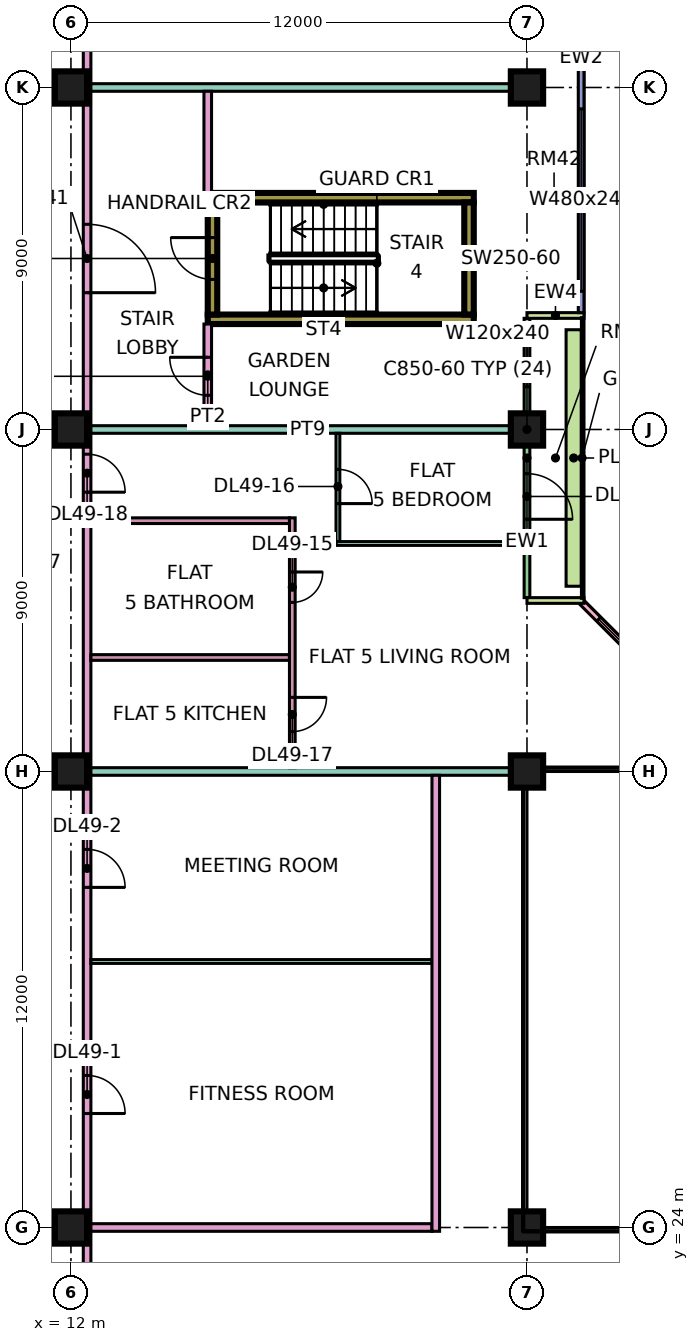
"""IFC4 building model, lengths in metres.
Left out: names, types, materials, properties, quantities, classifications, styles, units other than length and angle.
Written with IfcOpenShell. Run it as: python <this file> out.ifc"""

import sys

from ifc_helpers import new_model, si_unit, direction, frame, frame_2d, origin, origin_2d, place, context, subcontext, project, spatial, rectangle, extrude, element, fill, save


model = new_model("IFC4")
c1 = context("Model", 3, precision=1e-05, world=origin(), true_north=direction((0.0, 1.0)))
c2 = subcontext(c1, "Body", "Model", "MODEL_VIEW")
j1 = project(units=[si_unit("LENGTHUNIT", "METRE"), si_unit("PLANEANGLEUNIT", "RADIAN")], contexts=[c1])
p1 = place(None, origin())
s1 = spatial("IfcSite", under=j1, at=p1, CompositionType="ELEMENT")
p2 = place(p1, origin())
s2 = spatial("IfcBuilding", under=s1, at=p2, CompositionType="ELEMENT")
p3 = place(p2, frame((0.0, 0.0, 211.65)))
s3 = spatial("IfcBuildingStorey", under=s2, at=p3, CompositionType="ELEMENT", Elevation=211.65)
for number, where, z_axis, x_axis in (
    (1, (12.0, 24.0, 0.0), (0.0, 0.0, 1.0), (1.0, 0.0, 0.0)),
    (2, (12.0, 36.0, 0.0), (0.0, 0.0, 1.0), (1.0, 0.0, 0.0)),
    (3, (12.0, 45.0, 0.0), (0.0, 0.0, 1.0), (1.0, 0.0, 0.0)),
    (4, (12.0, 54.0, 0.0), (0.0, 0.0, 1.0), (1.0, 0.0, 0.0)),
    (5, (24.0, 24.0, 0.0), (0.0, 0.0, 1.0), (1.0, 0.0, 0.0)),
    (6, (24.0, 36.0, 0.0), (0.0, 0.0, 1.0), (1.0, 0.0, 0.0)),
    (7, (24.0, 45.0, 0.0), (0.0, 0.0, 1.0), (1.0, 0.0, 0.0)),
    (8, (24.0, 54.0, 0.0), (0.0, 0.0, 1.0), (1.0, 0.0, 0.0)),
):
    element("IfcColumn", number, at=place(p3, frame(where, z_axis=z_axis, x_axis=x_axis)), inside=s3, PredefinedType="COLUMN", context=c2, shape_type="SweptSolid", body=[
        extrude(rectangle(XDim=0.85, YDim=0.85, at=origin_2d()), origin(), (0.0, 0.0, 1.0), 3.75),
    ])
for number, where, z_axis, x_axis in (
    (9, (15.6, 47.9, 0.0), (0.0, 0.0, 1.0), (1.0, 0.0, 0.0)),
    (10, (15.6, 51.1, 0.0), (0.0, 0.0, 1.0), (1.0, 0.0, 0.0)),
):
    element("IfcWall", number, at=place(p3, frame(where, z_axis=z_axis, x_axis=x_axis)), inside=s3, PredefinedType="SHEAR", context=c2, shape_type="SweptSolid", body=[
        extrude(rectangle(XDim=7.0, YDim=0.25, at=frame_2d((3.5, 0.0))), origin(), (0.0, 0.0, 1.0), 3.75),
    ])
p4 = place(p3, frame((15.725, 48.025, 0.0), z_axis=(0.0, 0.0, 1.0), x_axis=(0.0, 1.0, 0.0)))
e11 = element("IfcWall", 11, at=p4, inside=s3, PredefinedType="SHEAR", context=c2, shape_type="SweptSolid", body=[
    extrude(rectangle(XDim=2.95, YDim=0.25, at=frame_2d((1.475, 0.0))), origin(), (0.0, 0.0, 1.0), 3.75),
])
p5 = place(p4, frame((0.925, 0.0, 0.0)))
e12 = element("IfcOpeningElement", 12, at=p5, cuts=e11, PredefinedType="OPENING", context=c2, shape_type="SweptSolid", body=[
    extrude(rectangle(XDim=1.1, YDim=2.2, at=frame_2d((0.55, 1.1))), frame((0.0, 0.135, 0.0), z_axis=(0.0, -1.0, 0.0), x_axis=(1.0, 0.0, 0.0)), (0.0, 0.0, 1.0), 0.27),
])
p6 = place(p3, frame((22.475, 48.025, 0.0), z_axis=(0.0, 0.0, 1.0), x_axis=(0.0, 1.0, 0.0)))
e13 = element("IfcWall", 13, at=p6, inside=s3, PredefinedType="SHEAR", context=c2, shape_type="SweptSolid", body=[
    extrude(rectangle(XDim=2.95, YDim=0.25, at=frame_2d((1.475, 0.0))), origin(), (0.0, 0.0, 1.0), 3.75),
])
p7 = place(p3, frame((28.447, 37.447, 0.0), z_axis=(0.0, 0.0, 1.0), x_axis=(-0.707106781187, 0.707106781187, 0.0)))
e14 = element("IfcWall", 14, at=p7, inside=s3, PredefinedType="SOLIDWALL", context=c2, shape_type="SweptSolid", body=[
    extrude(rectangle(XDim=4.243, YDim=0.15, at=frame_2d((2.121, 0.0))), origin(), (0.0, 0.0, 1.0), 3.35),
])
p8 = place(p7, frame((0.621, 0.0, 0.45)))
e15 = element("IfcOpeningElement", 15, at=p8, cuts=e14, PredefinedType="OPENING", context=c2, shape_type="SweptSolid", body=[
    extrude(rectangle(XDim=3.0, YDim=2.4, at=frame_2d((1.5, 1.2))), frame((0.0, 0.085, 0.0), z_axis=(0.0, -1.0, 0.0), x_axis=(1.0, 0.0, 0.0)), (0.0, 0.0, 1.0), 0.17),
])
p9 = place(p3, frame((24.0, 40.575, 0.0), z_axis=(0.0, 0.0, 1.0), x_axis=(0.0, 1.0, 0.0)))
e16 = element("IfcWall", 16, at=p9, inside=s3, PredefinedType="SOLIDWALL", context=c2, shape_type="SweptSolid", body=[
    extrude(rectangle(XDim=7.35, YDim=0.15, at=frame_2d((3.675, 0.0))), origin(), (0.0, 0.0, 1.0), 3.35),
])
p10 = place(p9, frame((2.062, 0.0, 0.0)))
e17 = element("IfcOpeningElement", 17, at=p10, cuts=e16, PredefinedType="OPENING", context=c2, shape_type="SweptSolid", body=[
    extrude(rectangle(XDim=1.2, YDim=2.4, at=frame_2d((0.6, 1.2))), frame((0.0, 0.085, 0.0), z_axis=(0.0, -1.0, 0.0), x_axis=(1.0, 0.0, 0.0)), (0.0, 0.0, 1.0), 0.17),
])
p11 = place(p9, frame((5.55, 0.0, 0.45)))
e18 = element("IfcOpeningElement", 18, at=p11, cuts=e16, PredefinedType="OPENING", context=c2, shape_type="SweptSolid", body=[
    extrude(rectangle(XDim=1.2, YDim=2.4, at=frame_2d((0.6, 1.2))), frame((0.0, 0.085, 0.0), z_axis=(0.0, -1.0, 0.0), x_axis=(1.0, 0.0, 0.0)), (0.0, 0.0, 1.0), 0.17),
])
for number, where, z_axis, x_axis in (
    (19, (25.5, 40.5, 0.0), (0.0, 0.0, 1.0), (-1.0, 0.0, 0.0)),
    (20, (25.5, 48.0, 0.0), (0.0, 0.0, 1.0), (-1.0, 0.0, 0.0)),
):
    element("IfcWall", number, at=place(p3, frame(where, z_axis=z_axis, x_axis=x_axis)), inside=s3, PredefinedType="SOLIDWALL", context=c2, shape_type="SweptSolid", body=[
        extrude(rectangle(XDim=1.5, YDim=0.15, at=frame_2d((0.75, 0.0))), origin(), (0.0, 0.0, 1.0), 3.35),
    ])
p12 = place(p3, frame((25.425, 48.075, 0.0), z_axis=(0.0, 0.0, 1.0), x_axis=(0.0, 1.0, 0.0)))
e21 = element("IfcWall", 21, at=p12, inside=s3, PredefinedType="SOLIDWALL", context=c2, shape_type="SweptSolid", body=[
    extrude(rectangle(XDim=13.425, YDim=0.15, at=frame_2d((6.712, 0.0))), origin(), (0.0, 0.0, 1.0), 3.35),
])
p13 = place(p12, frame((0.562, 0.0, 0.45)))
e22 = element("IfcOpeningElement", 22, at=p13, cuts=e21, PredefinedType="OPENING", context=c2, shape_type="SweptSolid", body=[
    extrude(rectangle(XDim=4.8, YDim=2.4, at=frame_2d((2.4, 1.2))), frame((0.0, 0.085, 0.0), z_axis=(0.0, -1.0, 0.0), x_axis=(1.0, 0.0, 0.0)), (0.0, 0.0, 1.0), 0.17),
])
p14 = place(p12, frame((7.425, 0.0, 0.45)))
e23 = element("IfcOpeningElement", 23, at=p14, cuts=e21, PredefinedType="OPENING", context=c2, shape_type="SweptSolid", body=[
    extrude(rectangle(XDim=3.0, YDim=2.4, at=frame_2d((1.5, 1.2))), frame((0.0, 0.085, 0.0), z_axis=(0.0, -1.0, 0.0), x_axis=(1.0, 0.0, 0.0)), (0.0, 0.0, 1.0), 0.17),
])
p15 = place(p12, frame((12.225, 0.0, 0.45)))
e24 = element("IfcOpeningElement", 24, at=p15, cuts=e21, PredefinedType="OPENING", context=c2, shape_type="SweptSolid", body=[
    extrude(rectangle(XDim=0.9, YDim=2.4, at=frame_2d((0.45, 1.2))), frame((0.0, 0.085, 0.0), z_axis=(0.0, -1.0, 0.0), x_axis=(1.0, 0.0, 0.0)), (0.0, 0.0, 1.0), 0.17),
])
p16 = place(p3, frame((25.229, 40.875, 0.0), z_axis=(0.0, 0.0, 1.0), x_axis=(0.0, 1.0, 0.0)))
e25 = element("IfcWall", 25, at=p16, inside=s3, PredefinedType="SOLIDWALL", context=c2, shape_type="SweptSolid", body=[
    extrude(rectangle(XDim=6.75, YDim=0.4, at=frame_2d((3.375, 0.0))), origin(), (0.0, 0.0, 1.0), 0.7),
])
p17 = place(p3, frame((12.425, 20.0, 0.0), z_axis=(0.0, 0.0, 1.0), x_axis=(0.0, 1.0, 0.0)))
e26 = element("IfcWall", 26, at=p17, inside=s3, PredefinedType="PARTITIONING", context=c2, shape_type="SweptSolid", body=[
    extrude(rectangle(XDim=42.926, YDim=0.2, at=frame_2d((21.463, 0.0))), origin(), (0.0, 0.0, 1.0), 3.35),
])
p18 = place(p17, frame((7.0, 0.0, 0.0)))
e27 = element("IfcOpeningElement", 27, at=p18, cuts=e26, PredefinedType="OPENING", context=c2, shape_type="SweptSolid", body=[
    extrude(rectangle(XDim=1.0, YDim=2.1, at=frame_2d((0.5, 1.05))), frame((0.0, 0.11, 0.0), z_axis=(0.0, -1.0, 0.0), x_axis=(1.0, 0.0, 0.0)), (0.0, 0.0, 1.0), 0.22),
])
p19 = place(p17, frame((12.95, 0.0, 0.0)))
e28 = element("IfcOpeningElement", 28, at=p19, cuts=e26, PredefinedType="OPENING", context=c2, shape_type="SweptSolid", body=[
    extrude(rectangle(XDim=1.0, YDim=2.1, at=frame_2d((0.5, 1.05))), frame((0.0, 0.11, 0.0), z_axis=(0.0, -1.0, 0.0), x_axis=(1.0, 0.0, 0.0)), (0.0, 0.0, 1.0), 0.22),
])
p20 = place(p17, frame((23.35, 0.0, 0.0)))
e29 = element("IfcOpeningElement", 29, at=p20, cuts=e26, PredefinedType="OPENING", context=c2, shape_type="SweptSolid", body=[
    extrude(rectangle(XDim=1.0, YDim=2.1, at=frame_2d((0.5, 1.05))), frame((0.0, 0.11, 0.0), z_axis=(0.0, -1.0, 0.0), x_axis=(1.0, 0.0, 0.0)), (0.0, 0.0, 1.0), 0.22),
])
p21 = place(p17, frame((35.2, 0.0, 0.0)))
e30 = element("IfcOpeningElement", 30, at=p21, cuts=e26, PredefinedType="OPENING", context=c2, shape_type="SweptSolid", body=[
    extrude(rectangle(XDim=1.0, YDim=2.1, at=frame_2d((0.5, 1.05))), frame((0.0, 0.11, 0.0), z_axis=(0.0, -1.0, 0.0), x_axis=(1.0, 0.0, 0.0)), (0.0, 0.0, 1.0), 0.22),
])
p22 = place(p17, frame((1.15, 0.0, 0.0)))
e31 = element("IfcOpeningElement", 31, at=p22, cuts=e26, PredefinedType="OPENING", context=c2, shape_type="SweptSolid", body=[
    extrude(rectangle(XDim=1.8, YDim=2.1, at=frame_2d((0.9, 1.05))), frame((0.0, 0.11, 0.0), z_axis=(0.0, -1.0, 0.0), x_axis=(1.0, 0.0, 0.0)), (0.0, 0.0, 1.0), 0.22),
])
p23 = place(p17, frame((28.6, 0.0, 0.0)))
e32 = element("IfcOpeningElement", 32, at=p23, cuts=e26, PredefinedType="OPENING", context=c2, shape_type="SweptSolid", body=[
    extrude(rectangle(XDim=1.8, YDim=2.1, at=frame_2d((0.9, 1.05))), frame((0.0, 0.11, 0.0), z_axis=(0.0, -1.0, 0.0), x_axis=(1.0, 0.0, 0.0)), (0.0, 0.0, 1.0), 0.22),
])
p24 = place(p3, frame((12.525, 24.0, 0.0), z_axis=(0.0, 0.0, 1.0), x_axis=(1.0, 0.0, 0.0)))
e33 = element("IfcWall", 33, at=p24, inside=s3, PredefinedType="PARTITIONING", context=c2, shape_type="SweptSolid", body=[
    extrude(rectangle(XDim=8.975, YDim=0.2, at=frame_2d((4.488, 0.0))), origin(), (0.0, 0.0, 1.0), 3.35),
])
p25 = place(p3, frame((12.525, 31.0, 0.0), z_axis=(0.0, 0.0, 1.0), x_axis=(1.0, 0.0, 0.0)))
e34 = element("IfcWall", 34, at=p25, inside=s3, PredefinedType="PARTITIONING", context=c2, shape_type="SweptSolid", body=[
    extrude(rectangle(XDim=8.975, YDim=0.1, at=frame_2d((4.488, 0.0))), origin(), (0.0, 0.0, 1.0), 3.35),
])
p26 = place(p3, frame((12.525, 36.0, 0.0), z_axis=(0.0, 0.0, 1.0), x_axis=(1.0, 0.0, 0.0)))
e35 = element("IfcWall", 35, at=p26, inside=s3, PredefinedType="PARTITIONING", context=c2, shape_type="SweptSolid", body=[
    extrude(rectangle(XDim=11.475, YDim=0.2, at=frame_2d((5.738, 0.0))), origin(), (0.0, 0.0, 1.0), 3.35),
])
for number, where, z_axis, x_axis in (
    (36, (12.525, 39.0, 0.0), (0.0, 0.0, 1.0), (1.0, 0.0, 0.0)),
    (37, (12.525, 42.6, 0.0), (0.0, 0.0, 1.0), (1.0, 0.0, 0.0)),
):
    element("IfcWall", number, at=place(p3, frame(where, z_axis=z_axis, x_axis=x_axis)), inside=s3, PredefinedType="PARTITIONING", context=c2, shape_type="SweptSolid", body=[
        extrude(rectangle(XDim=5.225, YDim=0.15, at=frame_2d((2.613, 0.0))), origin(), (0.0, 0.0, 1.0), 3.35),
    ])
p27 = place(p3, frame((12.525, 45.0, 0.0), z_axis=(0.0, 0.0, 1.0), x_axis=(1.0, 0.0, 0.0)))
e38 = element("IfcWall", 38, at=p27, inside=s3, PredefinedType="PARTITIONING", context=c2, shape_type="SweptSolid", body=[
    extrude(rectangle(XDim=11.401, YDim=0.2, at=frame_2d((5.701, 0.0))), origin(), (0.0, 0.0, 1.0), 3.35),
])
p28 = place(p3, frame((12.525, 54.0, 0.0), z_axis=(0.0, 0.0, 1.0), x_axis=(1.0, 0.0, 0.0)))
e39 = element("IfcWall", 39, at=p28, inside=s3, PredefinedType="PARTITIONING", context=c2, shape_type="SweptSolid", body=[
    extrude(rectangle(XDim=11.475, YDim=0.2, at=frame_2d((5.738, 0.0))), origin(), (0.0, 0.0, 1.0), 3.35),
])
p29 = place(p3, frame((15.6, 45.1, 0.0), z_axis=(0.0, 0.0, 1.0), x_axis=(0.0, 1.0, 0.0)))
e40 = element("IfcWall", 40, at=p29, inside=s3, PredefinedType="PARTITIONING", context=c2, shape_type="SweptSolid", body=[
    extrude(rectangle(XDim=2.675, YDim=0.2, at=frame_2d((1.337, 0.0))), origin(), (0.0, 0.0, 1.0), 3.35),
])
p30 = place(p29, frame((0.8, 0.0, 0.0)))
e41 = element("IfcOpeningElement", 41, at=p30, cuts=e40, PredefinedType="OPENING", context=c2, shape_type="SweptSolid", body=[
    extrude(rectangle(XDim=1.0, YDim=2.1, at=frame_2d((0.5, 1.05))), frame((0.0, 0.11, 0.0), z_axis=(0.0, -1.0, 0.0), x_axis=(1.0, 0.0, 0.0)), (0.0, 0.0, 1.0), 0.22),
])
p31 = place(p3, frame((15.6, 51.225, 0.0), z_axis=(0.0, 0.0, 1.0), x_axis=(0.0, 1.0, 0.0)))
e42 = element("IfcWall", 42, at=p31, inside=s3, PredefinedType="PARTITIONING", context=c2, shape_type="SweptSolid", body=[
    extrude(rectangle(XDim=2.675, YDim=0.2, at=frame_2d((1.337, 0.0))), origin(), (0.0, 0.0, 1.0), 3.35),
])
p32 = place(p3, frame((17.825, 36.1, 0.0), z_axis=(0.0, 0.0, 1.0), x_axis=(0.0, 1.0, 0.0)))
e43 = element("IfcWall", 43, at=p32, inside=s3, PredefinedType="PARTITIONING", context=c2, shape_type="SweptSolid", body=[
    extrude(rectangle(XDim=6.575, YDim=0.15, at=frame_2d((3.288, 0.0))), origin(), (0.0, 0.0, 1.0), 3.35),
])
p33 = place(p32, frame((4.35, 0.0, 0.0)))
e44 = element("IfcOpeningElement", 44, at=p33, cuts=e43, PredefinedType="OPENING", context=c2, shape_type="SweptSolid", body=[
    extrude(rectangle(XDim=0.8, YDim=2.1, at=frame_2d((0.4, 1.05))), frame((0.0, 0.085, 0.0), z_axis=(0.0, -1.0, 0.0), x_axis=(1.0, 0.0, 0.0)), (0.0, 0.0, 1.0), 0.17),
])
p34 = place(p32, frame((0.95, 0.0, 0.0)))
e45 = element("IfcOpeningElement", 45, at=p34, cuts=e43, PredefinedType="OPENING", context=c2, shape_type="SweptSolid", body=[
    extrude(rectangle(XDim=0.9, YDim=2.1, at=frame_2d((0.45, 1.05))), frame((0.0, 0.085, 0.0), z_axis=(0.0, -1.0, 0.0), x_axis=(1.0, 0.0, 0.0)), (0.0, 0.0, 1.0), 0.17),
])
p35 = place(p3, frame((18.975, 42.0, 0.0), z_axis=(0.0, 0.0, 1.0), x_axis=(1.0, 0.0, 0.0)))
e46 = element("IfcWall", 46, at=p35, inside=s3, PredefinedType="PARTITIONING", context=c2, shape_type="SweptSolid", body=[
    extrude(rectangle(XDim=4.951, YDim=0.1, at=frame_2d((2.476, 0.0))), origin(), (0.0, 0.0, 1.0), 3.35),
])
p36 = place(p3, frame((19.025, 42.05, 0.0), z_axis=(0.0, 0.0, 1.0), x_axis=(0.0, 1.0, 0.0)))
e47 = element("IfcWall", 47, at=p36, inside=s3, PredefinedType="PARTITIONING", context=c2, shape_type="SweptSolid", body=[
    extrude(rectangle(XDim=2.85, YDim=0.1, at=frame_2d((1.425, 0.0))), origin(), (0.0, 0.0, 1.0), 3.35),
])
p37 = place(p36, frame((1.0, 0.0, 0.0)))
e48 = element("IfcOpeningElement", 48, at=p37, cuts=e47, PredefinedType="OPENING", context=c2, shape_type="SweptSolid", body=[
    extrude(rectangle(XDim=0.9, YDim=2.1, at=frame_2d((0.45, 1.05))), frame((0.0, 0.06, 0.0), z_axis=(0.0, -1.0, 0.0), x_axis=(1.0, 0.0, 0.0)), (0.0, 0.0, 1.0), 0.12),
])
p38 = place(p3, frame((21.6, 23.9, 0.0), z_axis=(0.0, 0.0, 1.0), x_axis=(0.0, 1.0, 0.0)))
e49 = element("IfcWall", 49, at=p38, inside=s3, PredefinedType="PARTITIONING", context=c2, shape_type="SweptSolid", body=[
    extrude(rectangle(XDim=12.0, YDim=0.2, at=frame_2d((6.0, 0.0))), origin(), (0.0, 0.0, 1.0), 3.35),
])
p39 = place(p8, origin())
e50 = element("IfcWindow", 50, at=p39, inside=s3, PartitioningType="SINGLE_PANEL", PredefinedType="WINDOW", context=c2, shape_type="SweptSolid", body=[
    extrude(rectangle(XDim=3.0, YDim=2.4, at=frame_2d((1.5, 1.2))), frame((0.0, 0.03, 0.0), z_axis=(0.0, -1.0, 0.0), x_axis=(1.0, 0.0, 0.0)), (0.0, 0.0, 1.0), 0.06),
])
fill(e15, e50)
p40 = place(p10, frame((1.2, 0.0, 0.0), z_axis=(0.0, 0.0, 1.0), x_axis=(-1.0, 0.0, 0.0)))
e51 = element("IfcDoor", 51, at=p40, inside=s3, OperationType="DOUBLE_DOOR_SINGLE_SWING", PredefinedType="DOOR", context=c2, shape_type="SweptSolid", body=[
    extrude(rectangle(XDim=1.2, YDim=2.4, at=frame_2d((0.6, 1.2))), frame((0.0, 0.025, 0.0), z_axis=(0.0, -1.0, 0.0), x_axis=(1.0, 0.0, 0.0)), (0.0, 0.0, 1.0), 0.05),
])
fill(e17, e51)
p41 = place(p11, origin())
e52 = element("IfcWindow", 52, at=p41, inside=s3, PartitioningType="SINGLE_PANEL", PredefinedType="WINDOW", context=c2, shape_type="SweptSolid", body=[
    extrude(rectangle(XDim=1.2, YDim=2.4, at=frame_2d((0.6, 1.2))), frame((0.0, 0.03, 0.0), z_axis=(0.0, -1.0, 0.0), x_axis=(1.0, 0.0, 0.0)), (0.0, 0.0, 1.0), 0.06),
])
fill(e18, e52)
p42 = place(p13, origin())
e53 = element("IfcWindow", 53, at=p42, inside=s3, PartitioningType="SINGLE_PANEL", PredefinedType="WINDOW", context=c2, shape_type="SweptSolid", body=[
    extrude(rectangle(XDim=4.8, YDim=2.4, at=frame_2d((2.4, 1.2))), frame((0.0, 0.03, 0.0), z_axis=(0.0, -1.0, 0.0), x_axis=(1.0, 0.0, 0.0)), (0.0, 0.0, 1.0), 0.06),
])
fill(e22, e53)
p43 = place(p5, frame((1.1, 0.0, 0.0), z_axis=(0.0, 0.0, 1.0), x_axis=(-1.0, 0.0, 0.0)))
e54 = element("IfcDoor", 54, at=p43, inside=s3, OperationType="SINGLE_SWING_RIGHT", PredefinedType="DOOR", context=c2, shape_type="SweptSolid", body=[
    extrude(rectangle(XDim=1.1, YDim=2.2, at=frame_2d((0.55, 1.1))), frame((0.0, 0.025, 0.0), z_axis=(0.0, -1.0, 0.0), x_axis=(1.0, 0.0, 0.0)), (0.0, 0.0, 1.0), 0.05),
])
fill(e12, e54)
p44 = place(p18, frame((1.0, 0.0, 0.0), z_axis=(0.0, 0.0, 1.0), x_axis=(-1.0, 0.0, 0.0)))
e55 = element("IfcDoor", 55, at=p44, inside=s3, OperationType="SINGLE_SWING_LEFT", PredefinedType="DOOR", context=c2, shape_type="SweptSolid", body=[
    extrude(rectangle(XDim=1.0, YDim=2.1, at=frame_2d((0.5, 1.05))), frame((0.0, 0.025, 0.0), z_axis=(0.0, -1.0, 0.0), x_axis=(1.0, 0.0, 0.0)), (0.0, 0.0, 1.0), 0.05),
])
fill(e27, e55)
p45 = place(p19, frame((1.0, 0.0, 0.0), z_axis=(0.0, 0.0, 1.0), x_axis=(-1.0, 0.0, 0.0)))
e56 = element("IfcDoor", 56, at=p45, inside=s3, OperationType="SINGLE_SWING_LEFT", PredefinedType="DOOR", context=c2, shape_type="SweptSolid", body=[
    extrude(rectangle(XDim=1.0, YDim=2.1, at=frame_2d((0.5, 1.05))), frame((0.0, 0.025, 0.0), z_axis=(0.0, -1.0, 0.0), x_axis=(1.0, 0.0, 0.0)), (0.0, 0.0, 1.0), 0.05),
])
fill(e28, e56)
p46 = place(p33, origin())
e57 = element("IfcDoor", 57, at=p46, inside=s3, OperationType="SINGLE_SWING_RIGHT", PredefinedType="DOOR", context=c2, shape_type="SweptSolid", body=[
    extrude(rectangle(XDim=0.8, YDim=2.1, at=frame_2d((0.4, 1.05))), frame((0.0, 0.025, 0.0), z_axis=(0.0, -1.0, 0.0), x_axis=(1.0, 0.0, 0.0)), (0.0, 0.0, 1.0), 0.05),
])
fill(e44, e57)
p47 = place(p37, frame((0.9, 0.0, 0.0), z_axis=(0.0, 0.0, 1.0), x_axis=(-1.0, 0.0, 0.0)))
e58 = element("IfcDoor", 58, at=p47, inside=s3, OperationType="SINGLE_SWING_LEFT", PredefinedType="DOOR", context=c2, shape_type="SweptSolid", body=[
    extrude(rectangle(XDim=0.9, YDim=2.1, at=frame_2d((0.45, 1.05))), frame((0.0, 0.025, 0.0), z_axis=(0.0, -1.0, 0.0), x_axis=(1.0, 0.0, 0.0)), (0.0, 0.0, 1.0), 0.05),
])
fill(e48, e58)
p48 = place(p34, origin())
e59 = element("IfcDoor", 59, at=p48, inside=s3, OperationType="SINGLE_SWING_RIGHT", PredefinedType="DOOR", context=c2, shape_type="SweptSolid", body=[
    extrude(rectangle(XDim=0.9, YDim=2.1, at=frame_2d((0.45, 1.05))), frame((0.0, 0.025, 0.0), z_axis=(0.0, -1.0, 0.0), x_axis=(1.0, 0.0, 0.0)), (0.0, 0.0, 1.0), 0.05),
])
fill(e45, e59)
p49 = place(p20, frame((1.0, 0.0, 0.0), z_axis=(0.0, 0.0, 1.0), x_axis=(-1.0, 0.0, 0.0)))
e60 = element("IfcDoor", 60, at=p49, inside=s3, OperationType="SINGLE_SWING_LEFT", PredefinedType="DOOR", context=c2, shape_type="SweptSolid", body=[
    extrude(rectangle(XDim=1.0, YDim=2.1, at=frame_2d((0.5, 1.05))), frame((0.0, 0.025, 0.0), z_axis=(0.0, -1.0, 0.0), x_axis=(1.0, 0.0, 0.0)), (0.0, 0.0, 1.0), 0.05),
])
fill(e29, e60)
p50 = place(p23, frame((1.8, 0.0, 0.0), z_axis=(0.0, 0.0, 1.0), x_axis=(-1.0, 0.0, 0.0)))
e61 = element("IfcDoor", 61, at=p50, inside=s3, OperationType="DOUBLE_DOOR_SINGLE_SWING", PredefinedType="DOOR", context=c2, shape_type="SweptSolid", body=[
    extrude(rectangle(XDim=1.8, YDim=2.1, at=frame_2d((0.9, 1.05))), frame((0.0, 0.025, 0.0), z_axis=(0.0, -1.0, 0.0), x_axis=(1.0, 0.0, 0.0)), (0.0, 0.0, 1.0), 0.05),
])
fill(e32, e61)
p51 = place(p30, frame((1.0, 0.0, 0.0), z_axis=(0.0, 0.0, 1.0), x_axis=(-1.0, 0.0, 0.0)))
e62 = element("IfcDoor", 62, at=p51, inside=s3, OperationType="SINGLE_SWING_RIGHT", PredefinedType="DOOR", context=c2, shape_type="SweptSolid", body=[
    extrude(rectangle(XDim=1.0, YDim=2.1, at=frame_2d((0.5, 1.05))), frame((0.0, 0.025, 0.0), z_axis=(0.0, -1.0, 0.0), x_axis=(1.0, 0.0, 0.0)), (0.0, 0.0, 1.0), 0.05),
])
fill(e41, e62)
save(model, sys.argv[1])
